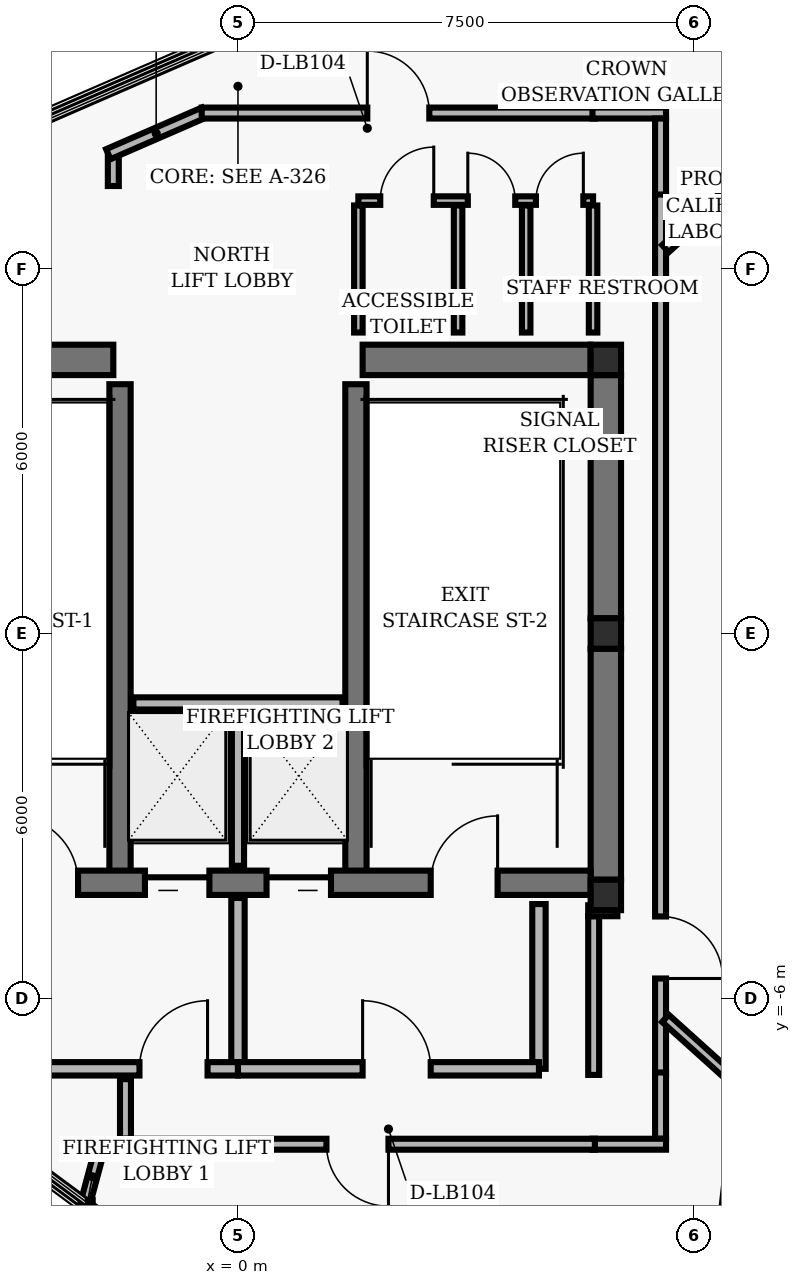
"""IFC4 building model, lengths in metres.
Left out: names, types, materials, properties, quantities, classifications, styles, units other than length and angle.
Written with IfcOpenShell. Run it as: python <this file> out.ifc"""

import sys

from ifc_helpers import new_model, si_unit, direction, frame, frame_2d, origin, origin_2d, place, context, subcontext, project, spatial, rectangle, hollow_rectangle, extrude, element, fill, save


model = new_model("IFC4")
c1 = context("Model", 3, precision=1e-05, world=origin(), true_north=direction((0.0, 1.0)))
c2 = subcontext(c1, "Body", "Model", "MODEL_VIEW")
j1 = project(units=[si_unit("LENGTHUNIT", "METRE"), si_unit("PLANEANGLEUNIT", "RADIAN")], contexts=[c1])
p1 = place(None, origin())
s1 = spatial("IfcSite", under=j1, at=p1, CompositionType="ELEMENT")
p2 = place(p1, origin())
s2 = spatial("IfcBuilding", under=s1, at=p2, CompositionType="ELEMENT")
p3 = place(p2, frame((0.0, 0.0, 254.88)))
s3 = spatial("IfcBuildingStorey", under=s2, at=p3, CompositionType="ELEMENT", Elevation=254.88)
for number, where, z_axis, x_axis in (
    (1, (6.05, 4.5, 0.0), (0.0, 0.0, 1.0), (1.0, 0.0, 0.0)),
    (2, (6.05, 0.0, 0.0), (0.0, 0.0, 1.0), (1.0, 0.0, 0.0)),
    (3, (6.05, -4.3, 0.0), (0.0, 0.0, 1.0), (1.0, 0.0, 0.0)),
):
    element("IfcColumn", number, at=place(p3, frame(where, z_axis=z_axis, x_axis=x_axis)), inside=s3, PredefinedType="COLUMN", context=c2, shape_type="SweptSolid", body=[
        extrude(hollow_rectangle(XDim=0.5, YDim=0.5, WallThickness=0.02, InnerFilletRadius=0.02, OuterFilletRadius=0.04, at=origin_2d()), origin(), (0.0, 0.0, 1.0), 2.88),
    ])
p4 = place(p3, frame((6.05, 0.25, 0.0), z_axis=(0.0, 0.0, 1.0), x_axis=(0.0, 1.0, 0.0)))
e4 = element("IfcWall", 4, at=p4, inside=s3, PredefinedType="SHEAR", context=c2, shape_type="SweptSolid", body=[
    extrude(rectangle(XDim=4.0, YDim=0.5, at=frame_2d((2.0, 0.0))), origin(), (0.0, 0.0, 1.0), 2.458),
])
p5 = place(p3, frame((6.05, -4.05, 0.0), z_axis=(0.0, 0.0, 1.0), x_axis=(0.0, 1.0, 0.0)))
e5 = element("IfcWall", 5, at=p5, inside=s3, PredefinedType="SHEAR", context=c2, shape_type="SweptSolid", body=[
    extrude(rectangle(XDim=3.8, YDim=0.5, at=frame_2d((1.9, 0.0))), origin(), (0.0, 0.0, 1.0), 2.458),
])
for number, where, z_axis, x_axis in (
    (6, (-1.94, -4.1, 0.0), (0.0, 0.0, 1.0), (0.0, 1.0, 0.0)),
    (7, (1.94, -4.1, 0.0), (0.0, 0.0, 1.0), (0.0, 1.0, 0.0)),
):
    element("IfcWall", number, at=place(p3, frame(where, z_axis=z_axis, x_axis=x_axis)), inside=s3, PredefinedType="SHEAR", context=c2, shape_type="SweptSolid", body=[
        extrude(rectangle(XDim=8.2, YDim=0.35, at=frame_2d((4.1, 0.0))), origin(), (0.0, 0.0, 1.0), 2.458),
    ])
p6 = place(p3, frame((-5.8, -4.1, 0.0), z_axis=(0.0, 0.0, 1.0), x_axis=(1.0, 0.0, 0.0)))
e8 = element("IfcWall", 8, at=p6, inside=s3, PredefinedType="SHEAR", context=c2, shape_type="SweptSolid", body=[
    extrude(rectangle(XDim=11.6, YDim=0.4, at=frame_2d((5.8, 0.0))), origin(), (0.0, 0.0, 1.0), 2.458),
])
p7 = place(p6, frame((2.07, 0.0, 0.0)))
e9 = element("IfcOpeningElement", 9, at=p7, cuts=e8, PredefinedType="OPENING", context=c2, shape_type="SweptSolid", body=[
    extrude(rectangle(XDim=1.1, YDim=2.04, at=frame_2d((0.55, 1.02))), frame((0.0, 0.21, 0.0), z_axis=(0.0, -1.0, 0.0), x_axis=(1.0, 0.0, 0.0)), (0.0, 0.0, 1.0), 0.42),
])
p8 = place(p6, frame((8.97, 0.0, 0.0)))
e10 = element("IfcOpeningElement", 10, at=p8, cuts=e8, PredefinedType="OPENING", context=c2, shape_type="SweptSolid", body=[
    extrude(rectangle(XDim=1.1, YDim=2.04, at=frame_2d((0.55, 1.02))), frame((0.0, 0.21, 0.0), z_axis=(0.0, -1.0, 0.0), x_axis=(1.0, 0.0, 0.0)), (0.0, 0.0, 1.0), 0.42),
])
p9 = place(p6, frame((4.27, 0.0, 0.0)))
e11 = element("IfcOpeningElement", 11, at=p9, cuts=e8, PredefinedType="OPENING", context=c2, shape_type="SweptSolid", body=[
    extrude(rectangle(XDim=1.06, YDim=2.04, at=frame_2d((0.53, 1.02))), frame((0.0, 0.21, 0.0), z_axis=(0.0, -1.0, 0.0), x_axis=(1.0, 0.0, 0.0)), (0.0, 0.0, 1.0), 0.42),
])
p10 = place(p6, frame((6.27, 0.0, 0.0)))
e12 = element("IfcOpeningElement", 12, at=p10, cuts=e8, PredefinedType="OPENING", context=c2, shape_type="SweptSolid", body=[
    extrude(rectangle(XDim=1.06, YDim=2.04, at=frame_2d((0.53, 1.02))), frame((0.0, 0.21, 0.0), z_axis=(0.0, -1.0, 0.0), x_axis=(1.0, 0.0, 0.0)), (0.0, 0.0, 1.0), 0.42),
])
for number, where, z_axis, x_axis in (
    (13, (-5.8, 4.5, 0.0), (0.0, 0.0, 1.0), (1.0, 0.0, 0.0)),
    (14, (2.05, 4.5, 0.0), (0.0, 0.0, 1.0), (1.0, 0.0, 0.0)),
):
    element("IfcWall", number, at=place(p3, frame(where, z_axis=z_axis, x_axis=x_axis)), inside=s3, PredefinedType="SHEAR", context=c2, shape_type="SweptSolid", body=[
        extrude(rectangle(XDim=3.75, YDim=0.5, at=frame_2d((1.875, 0.0))), origin(), (0.0, 0.0, 1.0), 2.458),
    ])
p11 = place(p3, frame((0.0, -3.82, 0.0), z_axis=(0.0, 0.0, 1.0), x_axis=(0.0, 1.0, 0.0)))
e15 = element("IfcWall", 15, at=p11, inside=s3, PredefinedType="PARTITIONING", context=c2, shape_type="SweptSolid", body=[
    extrude(rectangle(XDim=2.67, YDim=0.2, at=frame_2d((1.335, 0.0))), origin(), (0.0, 0.0, 1.0), 2.433),
])
p12 = place(p3, frame((-1.72, -1.15, 0.0), z_axis=(0.0, 0.0, 1.0), x_axis=(1.0, 0.0, 0.0)))
e16 = element("IfcWall", 16, at=p12, inside=s3, PredefinedType="PARTITIONING", context=c2, shape_type="SweptSolid", body=[
    extrude(rectangle(XDim=3.44, YDim=0.2, at=frame_2d((1.72, 0.0))), origin(), (0.0, 0.0, 1.0), 2.433),
])
p13 = place(p3, frame((4.95, -7.16, 0.0), z_axis=(0.0, 0.0, 1.0), x_axis=(0.0, 1.0, 0.0)))
e17 = element("IfcWall", 17, at=p13, inside=s3, PredefinedType="PARTITIONING", context=c2, shape_type="SweptSolid", body=[
    extrude(rectangle(XDim=2.71, YDim=0.22, at=frame_2d((1.355, 0.0))), origin(), (0.0, 0.0, 1.0), 2.433),
])
p14 = place(p3, frame((0.0, -7.16, 0.0), z_axis=(0.0, 0.0, 1.0), x_axis=(0.0, 1.0, 0.0)))
e18 = element("IfcWall", 18, at=p14, inside=s3, PredefinedType="PARTITIONING", context=c2, shape_type="SweptSolid", body=[
    extrude(rectangle(XDim=2.81, YDim=0.22, at=frame_2d((1.405, 0.0))), origin(), (0.0, 0.0, 1.0), 2.433),
])
p15 = place(p3, frame((-5.4, -7.16, 0.0), z_axis=(0.0, 0.0, 1.0), x_axis=(1.0, 0.0, 0.0)))
e19 = element("IfcWall", 19, at=p15, inside=s3, PredefinedType="PARTITIONING", context=c2, shape_type="SweptSolid", body=[
    extrude(rectangle(XDim=5.4, YDim=0.22, at=frame_2d((2.7, 0.0))), origin(), (0.0, 0.0, 1.0), 2.433),
])
p16 = place(p15, frame((3.78, 0.0, 0.0)))
e20 = element("IfcOpeningElement", 20, at=p16, cuts=e19, PredefinedType="OPENING", context=c2, shape_type="SweptSolid", body=[
    extrude(rectangle(XDim=1.12, YDim=2.02, at=frame_2d((0.56, 1.01))), frame((0.0, 0.12, 0.0), z_axis=(0.0, -1.0, 0.0), x_axis=(1.0, 0.0, 0.0)), (0.0, 0.0, 1.0), 0.24),
])
p17 = place(p3, frame((0.0, -7.16, 0.0), z_axis=(0.0, 0.0, 1.0), x_axis=(1.0, 0.0, 0.0)))
e21 = element("IfcWall", 21, at=p17, inside=s3, PredefinedType="PARTITIONING", context=c2, shape_type="SweptSolid", body=[
    extrude(rectangle(XDim=4.95, YDim=0.22, at=frame_2d((2.475, 0.0))), origin(), (0.0, 0.0, 1.0), 2.433),
])
p18 = place(p17, frame((2.05, 0.0, 0.0)))
e22 = element("IfcOpeningElement", 22, at=p18, cuts=e21, PredefinedType="OPENING", context=c2, shape_type="SweptSolid", body=[
    extrude(rectangle(XDim=1.12, YDim=2.02, at=frame_2d((0.56, 1.01))), frame((0.0, 0.12, 0.0), z_axis=(0.0, -1.0, 0.0), x_axis=(1.0, 0.0, 0.0)), (0.0, 0.0, 1.0), 0.24),
])
p19 = place(p3, frame((1.98, 4.95, 0.0), z_axis=(0.0, 0.0, 1.0), x_axis=(0.0, 1.0, 0.0)))
e23 = element("IfcWall", 23, at=p19, inside=s3, PredefinedType="PARTITIONING", context=c2, shape_type="SweptSolid", body=[
    extrude(rectangle(XDim=2.09, YDim=0.14, at=frame_2d((1.045, 0.0))), origin(), (0.0, 0.0, 1.0), 2.433),
])
p20 = place(p3, frame((5.84, 4.95, 0.0), z_axis=(0.0, 0.0, 1.0), x_axis=(0.0, 1.0, 0.0)))
e24 = element("IfcWall", 24, at=p20, inside=s3, PredefinedType="PARTITIONING", context=c2, shape_type="SweptSolid", body=[
    extrude(rectangle(XDim=2.09, YDim=0.14, at=frame_2d((1.045, 0.0))), origin(), (0.0, 0.0, 1.0), 1.963),
])
p21 = place(p3, frame((1.98, 7.12, 0.0), z_axis=(0.0, 0.0, 1.0), x_axis=(1.0, 0.0, 0.0)))
e25 = element("IfcWall", 25, at=p21, inside=s3, PredefinedType="PARTITIONING", context=c2, shape_type="SweptSolid", body=[
    extrude(rectangle(XDim=3.86, YDim=0.14, at=frame_2d((1.93, 0.0))), origin(), (0.0, 0.0, 1.0), 2.433),
])
p22 = place(p21, frame((0.36, 0.0, 0.0)))
e26 = element("IfcOpeningElement", 26, at=p22, cuts=e25, PredefinedType="OPENING", context=c2, shape_type="SweptSolid", body=[
    extrude(rectangle(XDim=0.88, YDim=2.02, at=frame_2d((0.44, 1.01))), frame((0.0, 0.08, 0.0), z_axis=(0.0, -1.0, 0.0), x_axis=(1.0, 0.0, 0.0)), (0.0, 0.0, 1.0), 0.16),
])
p23 = place(p21, frame((1.8, 0.0, 0.0)))
e27 = element("IfcOpeningElement", 27, at=p23, cuts=e25, PredefinedType="OPENING", context=c2, shape_type="SweptSolid", body=[
    extrude(rectangle(XDim=0.78, YDim=2.01, at=frame_2d((0.39, 1.005))), frame((0.0, 0.08, 0.0), z_axis=(0.0, -1.0, 0.0), x_axis=(1.0, 0.0, 0.0)), (0.0, 0.0, 1.0), 0.16),
])
p24 = place(p21, frame((2.92, 0.0, 0.0)))
e28 = element("IfcOpeningElement", 28, at=p24, cuts=e25, PredefinedType="OPENING", context=c2, shape_type="SweptSolid", body=[
    extrude(rectangle(XDim=0.78, YDim=2.01, at=frame_2d((0.39, 1.005))), frame((0.0, 0.08, 0.0), z_axis=(0.0, -1.0, 0.0), x_axis=(1.0, 0.0, 0.0)), (0.0, 0.0, 1.0), 0.16),
])
for number, where, z_axis, x_axis in (
    (29, (3.62, 4.95, 0.0), (0.0, 0.0, 1.0), (0.0, 1.0, 0.0)),
    (30, (4.74, 4.95, 0.0), (0.0, 0.0, 1.0), (0.0, 1.0, 0.0)),
):
    element("IfcWall", number, at=place(p3, frame(where, z_axis=z_axis, x_axis=x_axis)), inside=s3, PredefinedType="PARTITIONING", context=c2, shape_type="SweptSolid", body=[
        extrude(rectangle(XDim=2.09, YDim=0.14, at=frame_2d((1.045, 0.0))), origin(), (0.0, 0.0, 1.0), 2.433),
    ])
p25 = place(p3, frame((-1.85, -8.31, 0.0), z_axis=(0.0, 0.0, 1.0), x_axis=(0.0, 1.0, 0.0)))
e31 = element("IfcWall", 31, at=p25, inside=s3, PredefinedType="PARTITIONING", context=c2, shape_type="SweptSolid", body=[
    extrude(rectangle(XDim=0.98, YDim=0.18, at=frame_2d((0.49, 0.0))), origin(), (0.0, 0.0, 1.0), 2.433),
])
p26 = place(p3, frame((5.85, -7.26, 0.0), z_axis=(0.0, 0.0, 1.0), x_axis=(0.0, 1.0, 0.0)))
e32 = element("IfcWall", 32, at=p26, inside=s3, PredefinedType="PARTITIONING", context=c2, shape_type="SweptSolid", body=[
    extrude(rectangle(XDim=2.61, YDim=0.18, at=frame_2d((1.305, 0.0))), origin(), (0.0, 0.0, 1.0), 1.963),
])
p27 = place(p3, frame((5.76, -4.56, 0.0), z_axis=(0.0, 0.0, 1.0), x_axis=(1.0, 0.0, 0.0)))
e33 = element("IfcWall", 33, at=p27, inside=s3, PredefinedType="PARTITIONING", context=c2, shape_type="SweptSolid", body=[
    extrude(rectangle(XDim=0.48, YDim=0.18, at=frame_2d((0.24, 0.0))), origin(), (0.0, 0.0, 1.0), 2.433),
])
p28 = place(p3, frame((-2.05, 7.36, 0.0), z_axis=(0.0, 0.0, 1.0), x_axis=(0.0, 1.0, 0.0)))
e34 = element("IfcWall", 34, at=p28, inside=s3, PredefinedType="PARTITIONING", context=c2, shape_type="SweptSolid", body=[
    extrude(rectangle(XDim=0.489, YDim=0.18, at=frame_2d((0.245, 0.0))), origin(), (0.0, 0.0, 1.0), 2.433),
])
p29 = place(p3, frame((-2.133, 7.883, 0.0), z_axis=(0.0, 0.0, 1.0), x_axis=(0.91701353087, 0.398856094602, 0.0)))
e35 = element("IfcWall", 35, at=p29, inside=s3, PredefinedType="PARTITIONING", context=c2, shape_type="SweptSolid", body=[
    extrude(rectangle(XDim=1.717, YDim=0.18, at=frame_2d((0.858, 0.0))), origin(), (0.0, 0.0, 1.0), 2.013),
])
p30 = place(p3, frame((-0.596, 8.56, 0.0), z_axis=(0.0, 0.0, 1.0), x_axis=(1.0, 0.0, 0.0)))
e36 = element("IfcWall", 36, at=p30, inside=s3, PredefinedType="PARTITIONING", context=c2, shape_type="SweptSolid", body=[
    extrude(rectangle(XDim=6.467, YDim=0.18, at=frame_2d((3.233, 0.0))), origin(), (0.0, 0.0, 1.0), 2.433),
])
p31 = place(p30, frame((2.723, 0.0, 0.0)))
e37 = element("IfcOpeningElement", 37, at=p31, cuts=e36, PredefinedType="OPENING", context=c2, shape_type="SweptSolid", body=[
    extrude(rectangle(XDim=1.02, YDim=2.02, at=frame_2d((0.51, 1.01))), frame((0.0, 0.1, 0.0), z_axis=(0.0, -1.0, 0.0), x_axis=(1.0, 0.0, 0.0)), (0.0, 0.0, 1.0), 0.2),
])
p32 = place(p3, frame((5.83, 8.56, 0.0), z_axis=(0.0, 0.0, 1.0), x_axis=(1.0, 0.0, 0.0)))
e38 = element("IfcWall", 38, at=p32, inside=s3, PredefinedType="PARTITIONING", context=c2, shape_type="SweptSolid", body=[
    extrude(rectangle(XDim=1.21, YDim=0.18, at=frame_2d((0.605, 0.0))), origin(), (0.0, 0.0, 1.0), 2.433),
])
p33 = place(p3, frame((6.95, 8.47, 0.0), z_axis=(0.0, 0.0, 1.0), x_axis=(0.0, -1.0, 0.0)))
e39 = element("IfcWall", 39, at=p33, inside=s3, PredefinedType="PARTITIONING", context=c2, shape_type="SweptSolid", body=[
    extrude(rectangle(XDim=1.29, YDim=0.18, at=frame_2d((0.645, 0.0))), origin(), (0.0, 0.0, 1.0), 2.433),
])
p34 = place(p3, frame((6.95, 7.22, 0.0), z_axis=(0.0, 0.0, 1.0), x_axis=(0.0, -1.0, 0.0)))
e40 = element("IfcWall", 40, at=p34, inside=s3, PredefinedType="PARTITIONING", context=c2, shape_type="SweptSolid", body=[
    extrude(rectangle(XDim=14.48, YDim=0.18, at=frame_2d((7.24, 0.0))), origin(), (0.0, 0.0, 1.0), 2.433),
])
p35 = place(p34, frame((11.874, 0.0, 0.0)))
e41 = element("IfcOpeningElement", 41, at=p35, cuts=e40, PredefinedType="OPENING", context=c2, shape_type="SweptSolid", body=[
    extrude(rectangle(XDim=1.02, YDim=2.02, at=frame_2d((0.51, 1.01))), frame((0.0, 0.1, 0.0), z_axis=(0.0, -1.0, 0.0), x_axis=(1.0, 0.0, 0.0)), (0.0, 0.0, 1.0), 0.2),
])
p36 = place(p3, frame((6.95, -7.22, 0.0), z_axis=(0.0, 0.0, 1.0), x_axis=(0.0, -1.0, 0.0)))
e42 = element("IfcWall", 42, at=p36, inside=s3, PredefinedType="PARTITIONING", context=c2, shape_type="SweptSolid", body=[
    extrude(rectangle(XDim=1.09, YDim=0.18, at=frame_2d((0.545, 0.0))), origin(), (0.0, 0.0, 1.0), 1.963),
])
p37 = place(p3, frame((7.04, -8.4, 0.0), z_axis=(0.0, 0.0, 1.0), x_axis=(-1.0, 0.0, 0.0)))
e43 = element("IfcWall", 43, at=p37, inside=s3, PredefinedType="PARTITIONING", context=c2, shape_type="SweptSolid", body=[
    extrude(rectangle(XDim=1.21, YDim=0.18, at=frame_2d((0.605, 0.0))), origin(), (0.0, 0.0, 1.0), 2.433),
])
p38 = place(p3, frame((5.87, -8.4, 0.0), z_axis=(0.0, 0.0, 1.0), x_axis=(-1.0, 0.0, 0.0)))
e44 = element("IfcWall", 44, at=p38, inside=s3, PredefinedType="PARTITIONING", context=c2, shape_type="SweptSolid", body=[
    extrude(rectangle(XDim=7.81, YDim=0.18, at=frame_2d((3.905, 0.0))), origin(), (0.0, 0.0, 1.0), 2.433),
])
p39 = place(p38, frame((3.395, 0.0, 0.0)))
e45 = element("IfcOpeningElement", 45, at=p39, cuts=e44, PredefinedType="OPENING", context=c2, shape_type="SweptSolid", body=[
    extrude(rectangle(XDim=1.02, YDim=2.02, at=frame_2d((0.51, 1.01))), frame((0.0, 0.1, 0.0), z_axis=(0.0, -1.0, 0.0), x_axis=(1.0, 0.0, 0.0)), (0.0, 0.0, 1.0), 0.2),
])
p40 = place(p3, frame((-2.237, -8.35, 0.0), z_axis=(0.0, 0.0, 1.0), x_axis=(-0.258867090278, -0.965912951342, 0.0)))
e46 = element("IfcWall", 46, at=p40, inside=s3, PredefinedType="PARTITIONING", context=c2, shape_type="SweptSolid", body=[
    extrude(rectangle(XDim=1.211, YDim=0.16, at=frame_2d((0.605, 0.0))), origin(), (0.0, 0.0, 1.0), 2.433),
])
p41 = place(p3, frame((7.03, -6.33, 0.0), z_axis=(0.0, 0.0, 1.0), x_axis=(0.743152807618, -0.669121741188, 0.0)))
e47 = element("IfcWall", 47, at=p41, inside=s3, PredefinedType="PARTITIONING", context=c2, shape_type="SweptSolid", body=[
    extrude(rectangle(XDim=1.804, YDim=0.16, at=frame_2d((0.902, 0.0))), origin(), (0.0, 0.0, 1.0), 2.433),
])
p42 = place(p3, frame((7.03, 6.33, 0.0), z_axis=(0.0, 0.0, 1.0), x_axis=(0.74313056162, 0.669146447638, 0.0)))
e48 = element("IfcWall", 48, at=p42, inside=s3, PredefinedType="PARTITIONING", context=c2, shape_type="SweptSolid", body=[
    extrude(rectangle(XDim=4.379, YDim=0.16, at=frame_2d((2.189, 0.0))), origin(), (0.0, 0.0, 1.0), 1.963),
])
p43 = place(p7, origin())
e49 = element("IfcDoor", 49, at=p43, inside=s3, OperationType="SINGLE_SWING_LEFT", PredefinedType="DOOR", context=c2, shape_type="SweptSolid", body=[
    extrude(rectangle(XDim=1.1, YDim=2.04, at=frame_2d((0.55, 1.02))), frame((0.0, 0.025, 0.0), z_axis=(0.0, -1.0, 0.0), x_axis=(1.0, 0.0, 0.0)), (0.0, 0.0, 1.0), 0.05),
])
fill(e9, e49)
p44 = place(p8, origin())
e50 = element("IfcDoor", 50, at=p44, inside=s3, OperationType="SINGLE_SWING_RIGHT", PredefinedType="DOOR", context=c2, shape_type="SweptSolid", body=[
    extrude(rectangle(XDim=1.1, YDim=2.04, at=frame_2d((0.55, 1.02))), frame((0.0, 0.025, 0.0), z_axis=(0.0, -1.0, 0.0), x_axis=(1.0, 0.0, 0.0)), (0.0, 0.0, 1.0), 0.05),
])
fill(e10, e50)
p45 = place(p9, origin())
e51 = element("IfcDoor", 51, at=p45, inside=s3, OperationType="SLIDING_TO_LEFT", PredefinedType="DOOR", context=c2, shape_type="SweptSolid", body=[
    extrude(rectangle(XDim=1.06, YDim=2.04, at=frame_2d((0.53, 1.02))), frame((0.0, 0.025, 0.0), z_axis=(0.0, -1.0, 0.0), x_axis=(1.0, 0.0, 0.0)), (0.0, 0.0, 1.0), 0.05),
])
fill(e11, e51)
p46 = place(p10, origin())
e52 = element("IfcDoor", 52, at=p46, inside=s3, OperationType="SLIDING_TO_RIGHT", PredefinedType="DOOR", context=c2, shape_type="SweptSolid", body=[
    extrude(rectangle(XDim=1.06, YDim=2.04, at=frame_2d((0.53, 1.02))), frame((0.0, 0.025, 0.0), z_axis=(0.0, -1.0, 0.0), x_axis=(1.0, 0.0, 0.0)), (0.0, 0.0, 1.0), 0.05),
])
fill(e12, e52)
p47 = place(p16, origin())
e53 = element("IfcDoor", 53, at=p47, inside=s3, OperationType="SINGLE_SWING_RIGHT", PredefinedType="DOOR", context=c2, shape_type="SweptSolid", body=[
    extrude(rectangle(XDim=1.12, YDim=2.02, at=frame_2d((0.56, 1.01))), frame((0.0, 0.025, 0.0), z_axis=(0.0, -1.0, 0.0), x_axis=(1.0, 0.0, 0.0)), (0.0, 0.0, 1.0), 0.05),
])
fill(e20, e53)
p48 = place(p18, origin())
e54 = element("IfcDoor", 54, at=p48, inside=s3, OperationType="SINGLE_SWING_LEFT", PredefinedType="DOOR", context=c2, shape_type="SweptSolid", body=[
    extrude(rectangle(XDim=1.12, YDim=2.02, at=frame_2d((0.56, 1.01))), frame((0.0, 0.025, 0.0), z_axis=(0.0, -1.0, 0.0), x_axis=(1.0, 0.0, 0.0)), (0.0, 0.0, 1.0), 0.05),
])
fill(e22, e54)
p49 = place(p22, origin())
e55 = element("IfcDoor", 55, at=p49, inside=s3, OperationType="SINGLE_SWING_RIGHT", PredefinedType="DOOR", context=c2, shape_type="SweptSolid", body=[
    extrude(rectangle(XDim=0.88, YDim=2.02, at=frame_2d((0.44, 1.01))), frame((0.0, 0.025, 0.0), z_axis=(0.0, -1.0, 0.0), x_axis=(1.0, 0.0, 0.0)), (0.0, 0.0, 1.0), 0.05),
])
fill(e26, e55)
p50 = place(p23, origin())
e56 = element("IfcDoor", 56, at=p50, inside=s3, OperationType="SINGLE_SWING_LEFT", PredefinedType="DOOR", context=c2, shape_type="SweptSolid", body=[
    extrude(rectangle(XDim=0.78, YDim=2.01, at=frame_2d((0.39, 1.005))), frame((0.0, 0.025, 0.0), z_axis=(0.0, -1.0, 0.0), x_axis=(1.0, 0.0, 0.0)), (0.0, 0.0, 1.0), 0.05),
])
fill(e27, e56)
p51 = place(p24, origin())
e57 = element("IfcDoor", 57, at=p51, inside=s3, OperationType="SINGLE_SWING_RIGHT", PredefinedType="DOOR", context=c2, shape_type="SweptSolid", body=[
    extrude(rectangle(XDim=0.78, YDim=2.01, at=frame_2d((0.39, 1.005))), frame((0.0, 0.025, 0.0), z_axis=(0.0, -1.0, 0.0), x_axis=(1.0, 0.0, 0.0)), (0.0, 0.0, 1.0), 0.05),
])
fill(e28, e57)
p52 = place(p39, origin())
e58 = element("IfcDoor", 58, at=p52, inside=s3, OperationType="SINGLE_SWING_LEFT", PredefinedType="DOOR", context=c2, shape_type="SweptSolid", body=[
    extrude(rectangle(XDim=1.02, YDim=2.02, at=frame_2d((0.51, 1.01))), frame((0.0, 0.025, 0.0), z_axis=(0.0, -1.0, 0.0), x_axis=(1.0, 0.0, 0.0)), (0.0, 0.0, 1.0), 0.05),
])
fill(e45, e58)
p53 = place(p35, origin())
e59 = element("IfcDoor", 59, at=p53, inside=s3, OperationType="SINGLE_SWING_RIGHT", PredefinedType="DOOR", context=c2, shape_type="SweptSolid", body=[
    extrude(rectangle(XDim=1.02, YDim=2.02, at=frame_2d((0.51, 1.01))), frame((0.0, 0.025, 0.0), z_axis=(0.0, -1.0, 0.0), x_axis=(1.0, 0.0, 0.0)), (0.0, 0.0, 1.0), 0.05),
])
fill(e41, e59)
p54 = place(p31, origin())
e60 = element("IfcDoor", 60, at=p54, inside=s3, OperationType="SINGLE_SWING_LEFT", PredefinedType="DOOR", context=c2, shape_type="SweptSolid", body=[
    extrude(rectangle(XDim=1.02, YDim=2.02, at=frame_2d((0.51, 1.01))), frame((0.0, 0.025, 0.0), z_axis=(0.0, -1.0, 0.0), x_axis=(1.0, 0.0, 0.0)), (0.0, 0.0, 1.0), 0.05),
])
fill(e37, e60)
save(model, sys.argv[1])
